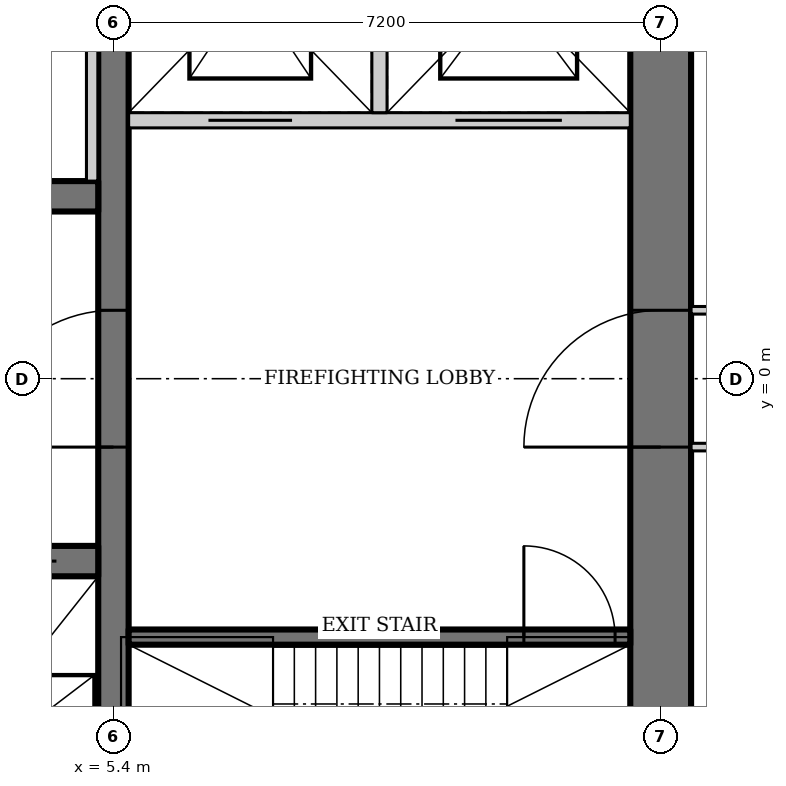
"""IFC4 building model, lengths in metres.
Left out: names, types, materials, properties, quantities, classifications, styles, units other than length and angle.
Written with IfcOpenShell. Run it as: python <this file> out.ifc"""

import sys

from ifc_helpers import new_model, si_unit, direction, frame, frame_2d, origin, place, context, subcontext, project, spatial, rectangle, extrude, element, fill, save


model = new_model("IFC4")
c1 = context("Model", 3, precision=1e-05, world=origin(), true_north=direction((0.0, 1.0)))
c2 = subcontext(c1, "Body", "Model", "MODEL_VIEW")
j1 = project(units=[si_unit("LENGTHUNIT", "METRE"), si_unit("PLANEANGLEUNIT", "RADIAN")], contexts=[c1])
p1 = place(None, origin())
s1 = spatial("IfcSite", under=j1, at=p1, CompositionType="ELEMENT")
p2 = place(p1, origin())
s2 = spatial("IfcBuilding", under=s1, at=p2, CompositionType="ELEMENT")
p3 = place(p2, frame((0.0, 0.0, 236.8)))
s3 = spatial("IfcBuildingStorey", under=s2, at=p3, CompositionType="ELEMENT", Elevation=236.8)
p4 = place(p3, frame((12.6, -13.0, 0.0), z_axis=(0.0, 0.0, 1.0), x_axis=(0.0, 1.0, 0.0)))
e1 = element("IfcWall", 1, at=p4, inside=s3, PredefinedType="SHEAR", context=c2, shape_type="SweptSolid", body=[
    extrude(rectangle(XDim=26.0, YDim=0.8, at=frame_2d((13.0, 0.0))), origin(), (0.0, 0.0, 1.0), 4.2),
])
p5 = place(p4, frame((12.1, 0.0, 0.0)))
e2 = element("IfcOpeningElement", 2, at=p5, cuts=e1, PredefinedType="OPENING", context=c2, shape_type="SweptSolid", body=[
    extrude(rectangle(XDim=1.8, YDim=2.1, at=frame_2d((0.9, 1.05))), frame((0.0, 0.41, 0.0), z_axis=(0.0, -1.0, 0.0), x_axis=(1.0, 0.0, 0.0)), (0.0, 0.0, 1.0), 0.82),
])
p6 = place(p3, frame((5.4, -6.8, 0.0), z_axis=(0.0, 0.0, 1.0), x_axis=(0.0, 1.0, 0.0)))
e3 = element("IfcWall", 3, at=p6, inside=s3, PredefinedType="SHEAR", context=c2, shape_type="SweptSolid", body=[
    extrude(rectangle(XDim=14.6, YDim=0.4, at=frame_2d((7.3, 0.0))), origin(), (0.0, 0.0, 1.0), 4.2),
])
p7 = place(p6, frame((5.9, 0.0, 0.0)))
e4 = element("IfcOpeningElement", 4, at=p7, cuts=e3, PredefinedType="OPENING", context=c2, shape_type="SweptSolid", body=[
    extrude(rectangle(XDim=1.8, YDim=2.1, at=frame_2d((0.9, 1.05))), frame((0.0, 0.21, 0.0), z_axis=(0.0, -1.0, 0.0), x_axis=(1.0, 0.0, 0.0)), (0.0, 0.0, 1.0), 0.42),
])
p8 = place(p3, frame((-5.2, -2.4, 0.0), z_axis=(0.0, 0.0, 1.0), x_axis=(1.0, 0.0, 0.0)))
e5 = element("IfcWall", 5, at=p8, inside=s3, PredefinedType="SHEAR", context=c2, shape_type="SweptSolid", body=[
    extrude(rectangle(XDim=10.4, YDim=0.4, at=frame_2d((5.2, 0.0))), origin(), (0.0, 0.0, 1.0), 4.2),
])
p9 = place(p8, frame((1.683, 0.0, 0.0)))
e6 = element("IfcOpeningElement", 6, at=p9, cuts=e5, PredefinedType="OPENING", context=c2, shape_type="SweptSolid", body=[
    extrude(rectangle(XDim=1.1, YDim=2.2, at=frame_2d((0.55, 1.1))), frame((0.0, 0.21, 0.0), z_axis=(0.0, -1.0, 0.0), x_axis=(1.0, 0.0, 0.0)), (0.0, 0.0, 1.0), 0.42),
])
p10 = place(p8, frame((5.217, 0.0, 0.0)))
e7 = element("IfcOpeningElement", 7, at=p10, cuts=e5, PredefinedType="OPENING", context=c2, shape_type="SweptSolid", body=[
    extrude(rectangle(XDim=1.1, YDim=2.2, at=frame_2d((0.55, 1.1))), frame((0.0, 0.21, 0.0), z_axis=(0.0, -1.0, 0.0), x_axis=(1.0, 0.0, 0.0)), (0.0, 0.0, 1.0), 0.42),
])
p11 = place(p8, frame((8.75, 0.0, 0.0)))
e8 = element("IfcOpeningElement", 8, at=p11, cuts=e5, PredefinedType="OPENING", context=c2, shape_type="SweptSolid", body=[
    extrude(rectangle(XDim=1.1, YDim=2.2, at=frame_2d((0.55, 1.1))), frame((0.0, 0.21, 0.0), z_axis=(0.0, -1.0, 0.0), x_axis=(1.0, 0.0, 0.0)), (0.0, 0.0, 1.0), 0.42),
])
p12 = place(p3, frame((5.2, 2.4, 0.0), z_axis=(0.0, 0.0, 1.0), x_axis=(-1.0, 0.0, 0.0)))
e9 = element("IfcWall", 9, at=p12, inside=s3, PredefinedType="SHEAR", context=c2, shape_type="SweptSolid", body=[
    extrude(rectangle(XDim=10.4, YDim=0.4, at=frame_2d((5.2, 0.0))), origin(), (0.0, 0.0, 1.0), 4.2),
])
p13 = place(p3, frame((5.6, -3.4, 0.0), z_axis=(0.0, 0.0, 1.0), x_axis=(1.0, 0.0, 0.0)))
e10 = element("IfcWall", 10, at=p13, inside=s3, PredefinedType="SHEAR", context=c2, shape_type="SweptSolid", body=[
    extrude(rectangle(XDim=6.6, YDim=0.2, at=frame_2d((3.3, 0.0))), origin(), (0.0, 0.0, 1.0), 4.2),
])
p14 = place(p13, frame((5.2, 0.0, 0.0)))
e11 = element("IfcOpeningElement", 11, at=p14, cuts=e10, PredefinedType="OPENING", context=c2, shape_type="SweptSolid", body=[
    extrude(rectangle(XDim=1.2, YDim=2.1, at=frame_2d((0.6, 1.05))), frame((0.0, 0.11, 0.0), z_axis=(0.0, -1.0, 0.0), x_axis=(1.0, 0.0, 0.0)), (0.0, 0.0, 1.0), 0.22),
])
p15 = place(p3, frame((12.2, 3.4, 0.0), z_axis=(0.0, 0.0, 1.0), x_axis=(-1.0, 0.0, 0.0)))
e12 = element("IfcWall", 12, at=p15, inside=s3, PredefinedType="SOLIDWALL", context=c2, shape_type="SweptSolid", body=[
    extrude(rectangle(XDim=6.6, YDim=0.2, at=frame_2d((3.3, 0.0))), origin(), (0.0, 0.0, 1.0), 4.2),
])
p16 = place(p15, frame((4.45, 0.0, 0.0)))
e13 = element("IfcOpeningElement", 13, at=p16, cuts=e12, PredefinedType="OPENING", context=c2, shape_type="SweptSolid", body=[
    extrude(rectangle(XDim=1.1, YDim=2.2, at=frame_2d((0.55, 1.1))), frame((0.0, 0.11, 0.0), z_axis=(0.0, -1.0, 0.0), x_axis=(1.0, 0.0, 0.0)), (0.0, 0.0, 1.0), 0.22),
])
p17 = place(p15, frame((0.9, 0.0, 0.0)))
e14 = element("IfcOpeningElement", 14, at=p17, cuts=e12, PredefinedType="OPENING", context=c2, shape_type="SweptSolid", body=[
    extrude(rectangle(XDim=1.4, YDim=2.2, at=frame_2d((0.7, 1.1))), frame((0.0, 0.11, 0.0), z_axis=(0.0, -1.0, 0.0), x_axis=(1.0, 0.0, 0.0)), (0.0, 0.0, 1.0), 0.22),
])
p18 = place(p3, frame((8.9, 3.5, 0.0), z_axis=(0.0, 0.0, 1.0), x_axis=(0.0, 1.0, 0.0)))
e15 = element("IfcWall", 15, at=p18, inside=s3, PredefinedType="SOLIDWALL", context=c2, shape_type="SweptSolid", body=[
    extrude(rectangle(XDim=3.3, YDim=0.2, at=frame_2d((1.65, 0.0))), origin(), (0.0, 0.0, 1.0), 4.2),
])
p19 = place(p3, frame((5.12, 2.6, 0.0), z_axis=(0.0, 0.0, 1.0), x_axis=(0.0, 1.0, 0.0)))
e16 = element("IfcWall", 16, at=p19, inside=s3, PredefinedType="SOLIDWALL", context=c2, shape_type="SweptSolid", body=[
    extrude(rectangle(XDim=4.4, YDim=0.15, at=frame_2d((2.2, 0.0))), origin(), (0.0, 0.0, 1.0), 4.05),
])
p20 = place(p3, frame((13.0, -0.9, 0.0), z_axis=(0.0, 0.0, 1.0), x_axis=(1.0, 0.0, 0.0)))
e17 = element("IfcWall", 17, at=p20, inside=s3, PredefinedType="PARTITIONING", context=c2, shape_type="SweptSolid", body=[
    extrude(rectangle(XDim=2.165, YDim=0.1, at=frame_2d((1.083, 0.0))), origin(), (0.0, 0.0, 1.0), 4.05),
])
p21 = place(p20, frame((1.15, 0.0, 0.0)))
e18 = element("IfcOpeningElement", 18, at=p21, cuts=e17, PredefinedType="OPENING", context=c2, shape_type="SweptSolid", body=[
    extrude(rectangle(XDim=0.9, YDim=2.1, at=frame_2d((0.45, 1.05))), frame((0.0, 0.06, 0.0), z_axis=(0.0, -1.0, 0.0), x_axis=(1.0, 0.0, 0.0)), (0.0, 0.0, 1.0), 0.12),
])
p22 = place(p3, frame((15.165, 0.9, 0.0), z_axis=(0.0, 0.0, 1.0), x_axis=(-1.0, 0.0, 0.0)))
e19 = element("IfcWall", 19, at=p22, inside=s3, PredefinedType="PARTITIONING", context=c2, shape_type="SweptSolid", body=[
    extrude(rectangle(XDim=2.165, YDim=0.1, at=frame_2d((1.083, 0.0))), origin(), (0.0, 0.0, 1.0), 4.05),
])
p23 = place(p22, frame((0.1, 0.0, 0.0)))
e20 = element("IfcOpeningElement", 20, at=p23, cuts=e19, PredefinedType="OPENING", context=c2, shape_type="SweptSolid", body=[
    extrude(rectangle(XDim=0.9, YDim=2.1, at=frame_2d((0.45, 1.05))), frame((0.0, 0.06, 0.0), z_axis=(0.0, -1.0, 0.0), x_axis=(1.0, 0.0, 0.0)), (0.0, 0.0, 1.0), 0.12),
])
p24 = place(p7, origin())
e21 = element("IfcDoor", 21, at=p24, inside=s3, OperationType="DOUBLE_DOOR_DOUBLE_SWING", PredefinedType="DOOR", context=c2, shape_type="SweptSolid", body=[
    extrude(rectangle(XDim=1.8, YDim=2.1, at=frame_2d((0.9, 1.05))), frame((0.0, 0.025, 0.0), z_axis=(0.0, -1.0, 0.0), x_axis=(1.0, 0.0, 0.0)), (0.0, 0.0, 1.0), 0.05),
])
fill(e4, e21)
p25 = place(p14, origin())
e22 = element("IfcDoor", 22, at=p25, inside=s3, OperationType="SINGLE_SWING_RIGHT", PredefinedType="DOOR", context=c2, shape_type="SweptSolid", body=[
    extrude(rectangle(XDim=1.2, YDim=2.1, at=frame_2d((0.6, 1.05))), frame((0.0, 0.025, 0.0), z_axis=(0.0, -1.0, 0.0), x_axis=(1.0, 0.0, 0.0)), (0.0, 0.0, 1.0), 0.05),
])
fill(e11, e22)
p26 = place(p5, origin())
e23 = element("IfcDoor", 23, at=p26, inside=s3, OperationType="DOUBLE_DOOR_DOUBLE_SWING", PredefinedType="DOOR", context=c2, shape_type="SweptSolid", body=[
    extrude(rectangle(XDim=1.8, YDim=2.1, at=frame_2d((0.9, 1.05))), frame((0.0, 0.025, 0.0), z_axis=(0.0, -1.0, 0.0), x_axis=(1.0, 0.0, 0.0)), (0.0, 0.0, 1.0), 0.05),
])
fill(e2, e23)
p27 = place(p11, origin())
e24 = element("IfcDoor", 24, at=p27, inside=s3, OperationType="DOUBLE_DOOR_SLIDING", PredefinedType="DOOR", context=c2, shape_type="SweptSolid", body=[
    extrude(rectangle(XDim=1.1, YDim=2.2, at=frame_2d((0.55, 1.1))), frame((0.0, 0.025, 0.0), z_axis=(0.0, -1.0, 0.0), x_axis=(1.0, 0.0, 0.0)), (0.0, 0.0, 1.0), 0.05),
])
fill(e8, e24)
p28 = place(p16, origin())
e25 = element("IfcDoor", 25, at=p28, inside=s3, OperationType="DOUBLE_DOOR_SLIDING", PredefinedType="DOOR", context=c2, shape_type="SweptSolid", body=[
    extrude(rectangle(XDim=1.1, YDim=2.2, at=frame_2d((0.55, 1.1))), frame((0.0, 0.025, 0.0), z_axis=(0.0, -1.0, 0.0), x_axis=(1.0, 0.0, 0.0)), (0.0, 0.0, 1.0), 0.05),
])
fill(e13, e25)
p29 = place(p17, origin())
e26 = element("IfcDoor", 26, at=p29, inside=s3, OperationType="DOUBLE_DOOR_SLIDING", PredefinedType="DOOR", context=c2, shape_type="SweptSolid", body=[
    extrude(rectangle(XDim=1.4, YDim=2.2, at=frame_2d((0.7, 1.1))), frame((0.0, 0.025, 0.0), z_axis=(0.0, -1.0, 0.0), x_axis=(1.0, 0.0, 0.0)), (0.0, 0.0, 1.0), 0.05),
])
fill(e14, e26)
save(model, sys.argv[1])
